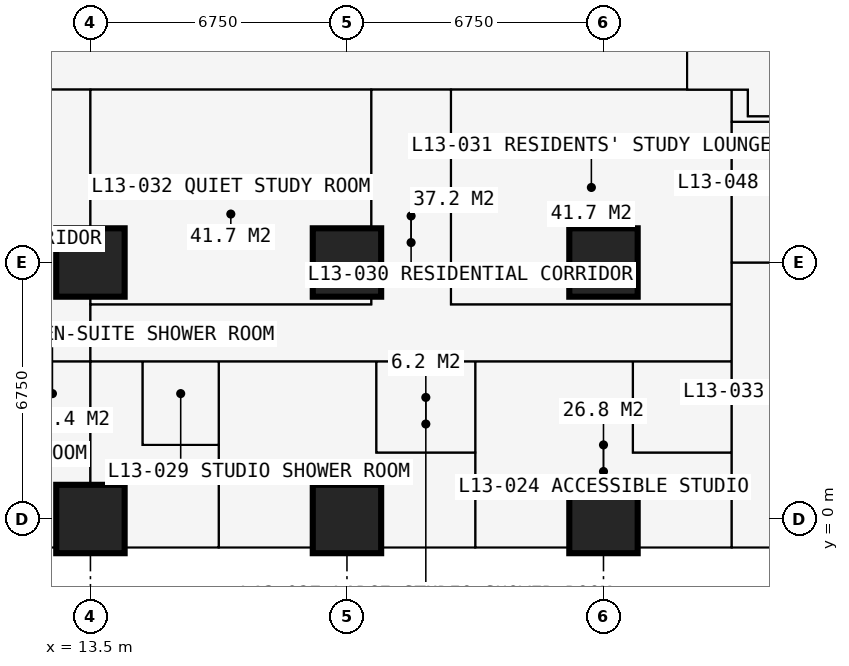
"""IFC4 building model, lengths in metres.
Left out: names, types, materials, properties, quantities, classifications, styles, units other than length and angle.
Written with IfcOpenShell. Run it as: python <this file> out.ifc"""

import sys

from ifc_helpers import new_model, si_unit, direction, frame, frame_2d, origin, origin_2d, place, context, subcontext, project, spatial, rectangle, extrude, element, fill, save


model = new_model("IFC4")
c1 = context("Model", 3, precision=1e-05, world=origin(), true_north=direction((0.0, 1.0)))
c2 = subcontext(c1, "Body", "Model", "MODEL_VIEW")
j1 = project(units=[si_unit("LENGTHUNIT", "METRE"), si_unit("PLANEANGLEUNIT", "RADIAN")], contexts=[c1])
p1 = place(None, origin())
s1 = spatial("IfcSite", under=j1, at=p1, CompositionType="ELEMENT")
p2 = place(p1, origin())
s2 = spatial("IfcBuilding", under=s1, at=p2, CompositionType="ELEMENT")
p3 = place(p2, frame((0.0, 0.0, 50.4)))
s3 = spatial("IfcBuildingStorey", under=s2, at=p3, CompositionType="ELEMENT", Elevation=50.4)
for number, where, z_axis, x_axis in (
    (1, (13.5, 0.0, 0.0), (0.0, 0.0, 1.0), (1.0, 0.0, 0.0)),
    (2, (13.5, 6.75, 0.0), (0.0, 0.0, 1.0), (1.0, 0.0, 0.0)),
    (3, (20.25, 0.0, 0.0), (0.0, 0.0, 1.0), (1.0, 0.0, 0.0)),
    (4, (20.25, 6.75, 0.0), (0.0, 0.0, 1.0), (1.0, 0.0, 0.0)),
    (5, (27.0, 0.0, 0.0), (0.0, 0.0, 1.0), (1.0, 0.0, 0.0)),
    (6, (27.0, 6.75, 0.0), (0.0, 0.0, 1.0), (1.0, 0.0, 0.0)),
):
    element("IfcColumn", number, at=place(p3, frame(where, z_axis=z_axis, x_axis=x_axis)), inside=s3, PredefinedType="COLUMN", context=c2, shape_type="SweptSolid", body=[
        extrude(rectangle(XDim=1.8, YDim=1.8, at=origin_2d()), origin(), (0.0, 0.0, 1.0), 3.6),
    ])
p4 = place(p3, frame((27.0, -0.75, 0.0), z_axis=(0.0, 0.0, 1.0), x_axis=(-1.0, 0.0, 0.0)))
e7 = element("IfcWall", 7, at=p4, inside=s3, PredefinedType="SOLIDWALL", context=c2, shape_type="SweptSolid", body=[
    extrude(rectangle(XDim=6.75, YDim=0.15, at=frame_2d((3.375, 0.0))), origin(), (0.0, 0.0, 1.0), 3.375),
])
p5 = place(p4, frame((0.962, 0.0, 0.0)))
e8 = element("IfcOpeningElement", 8, at=p5, cuts=e7, PredefinedType="OPENING", context=c2, shape_type="SweptSolid", body=[
    extrude(rectangle(XDim=1.0, YDim=2.2, at=frame_2d((0.5, 1.1))), frame((0.0, 0.085, 0.0), z_axis=(0.0, -1.0, 0.0), x_axis=(1.0, 0.0, 0.0)), (0.0, 0.0, 1.0), 0.17),
])
p6 = place(p4, frame((2.025, 0.0, 0.9)))
e9 = element("IfcOpeningElement", 9, at=p6, cuts=e7, PredefinedType="OPENING", context=c2, shape_type="SweptSolid", body=[
    extrude(rectangle(XDim=1.2, YDim=1.8, at=frame_2d((0.6, 0.9))), frame((0.0, 0.085, 0.0), z_axis=(0.0, -1.0, 0.0), x_axis=(1.0, 0.0, 0.0)), (0.0, 0.0, 1.0), 0.17),
])
p7 = place(p4, frame((4.788, 0.0, 0.0)))
e10 = element("IfcOpeningElement", 10, at=p7, cuts=e7, PredefinedType="OPENING", context=c2, shape_type="SweptSolid", body=[
    extrude(rectangle(XDim=1.0, YDim=2.2, at=frame_2d((0.5, 1.1))), frame((0.0, 0.085, 0.0), z_axis=(0.0, -1.0, 0.0), x_axis=(1.0, 0.0, 0.0)), (0.0, 0.0, 1.0), 0.17),
])
p8 = place(p4, frame((3.525, 0.0, 0.9)))
e11 = element("IfcOpeningElement", 11, at=p8, cuts=e7, PredefinedType="OPENING", context=c2, shape_type="SweptSolid", body=[
    extrude(rectangle(XDim=1.2, YDim=1.8, at=frame_2d((0.6, 0.9))), frame((0.0, 0.085, 0.0), z_axis=(0.0, -1.0, 0.0), x_axis=(1.0, 0.0, 0.0)), (0.0, 0.0, 1.0), 0.17),
])
p9 = place(p3, frame((23.625, -0.85, 0.0), z_axis=(0.0, 0.0, 1.0), x_axis=(0.0, -1.0, 0.0)))
e12 = element("IfcWall", 12, at=p9, inside=s3, PredefinedType="USERDEFINED", context=c2, shape_type="SweptSolid", body=[
    extrude(rectangle(XDim=2.2, YDim=1.0, at=frame_2d((1.1, 0.0))), origin(), (0.0, 0.0, 1.0), 0.9),
])
p10 = place(p3, frame((6.75, 4.15, 0.0), z_axis=(0.0, 0.0, 1.0), x_axis=(1.0, 0.0, 0.0)))
e13 = element("IfcWall", 13, at=p10, inside=s3, PredefinedType="PARTITIONING", context=c2, shape_type="SweptSolid", body=[
    extrude(rectangle(XDim=23.625, YDim=0.15, at=frame_2d((11.812, 0.0))), origin(), (0.0, 0.0, 1.0), 3.375),
])
p11 = place(p10, frame((0.2, 0.0, 0.0)))
e14 = element("IfcOpeningElement", 14, at=p11, cuts=e13, PredefinedType="OPENING", context=c2, shape_type="SweptSolid", body=[
    extrude(rectangle(XDim=0.95, YDim=2.2, at=frame_2d((0.475, 1.1))), frame((0.0, 0.085, 0.0), z_axis=(0.0, -1.0, 0.0), x_axis=(1.0, 0.0, 0.0)), (0.0, 0.0, 1.0), 0.17),
])
p12 = place(p10, frame((3.625, 0.0, 0.0)))
e15 = element("IfcOpeningElement", 15, at=p12, cuts=e13, PredefinedType="OPENING", context=c2, shape_type="SweptSolid", body=[
    extrude(rectangle(XDim=0.95, YDim=2.2, at=frame_2d((0.475, 1.1))), frame((0.0, 0.085, 0.0), z_axis=(0.0, -1.0, 0.0), x_axis=(1.0, 0.0, 0.0)), (0.0, 0.0, 1.0), 0.17),
])
p13 = place(p10, frame((18.475, 0.0, 0.0)))
e16 = element("IfcOpeningElement", 16, at=p13, cuts=e13, PredefinedType="OPENING", context=c2, shape_type="SweptSolid", body=[
    extrude(rectangle(XDim=0.95, YDim=2.2, at=frame_2d((0.475, 1.1))), frame((0.0, 0.085, 0.0), z_axis=(0.0, -1.0, 0.0), x_axis=(1.0, 0.0, 0.0)), (0.0, 0.0, 1.0), 0.17),
])
p14 = place(p10, frame((11.725, 0.0, 0.0)))
e17 = element("IfcOpeningElement", 17, at=p14, cuts=e13, PredefinedType="OPENING", context=c2, shape_type="SweptSolid", body=[
    extrude(rectangle(XDim=0.95, YDim=2.2, at=frame_2d((0.475, 1.1))), frame((0.0, 0.085, 0.0), z_axis=(0.0, -1.0, 0.0), x_axis=(1.0, 0.0, 0.0)), (0.0, 0.0, 1.0), 0.17),
])
p15 = place(p10, frame((6.95, 0.0, 0.0)))
e18 = element("IfcOpeningElement", 18, at=p15, cuts=e13, PredefinedType="OPENING", context=c2, shape_type="SweptSolid", body=[
    extrude(rectangle(XDim=0.95, YDim=2.2, at=frame_2d((0.475, 1.1))), frame((0.0, 0.085, 0.0), z_axis=(0.0, -1.0, 0.0), x_axis=(1.0, 0.0, 0.0)), (0.0, 0.0, 1.0), 0.17),
])
p16 = place(p3, frame((10.125, 11.3, 0.0), z_axis=(0.0, 0.0, 1.0), x_axis=(1.0, 0.0, 0.0)))
e19 = element("IfcWall", 19, at=p16, inside=s3, PredefinedType="PARTITIONING", context=c2, shape_type="SweptSolid", body=[
    extrude(rectangle(XDim=20.675, YDim=0.15, at=frame_2d((10.337, 0.0))), origin(), (0.0, 0.0, 1.0), 3.375),
])
p17 = place(p16, frame((1.775, 0.0, 0.0)))
e20 = element("IfcOpeningElement", 20, at=p17, cuts=e19, PredefinedType="OPENING", context=c2, shape_type="SweptSolid", body=[
    extrude(rectangle(XDim=1.0, YDim=2.2, at=frame_2d((0.5, 1.1))), frame((0.0, 0.085, 0.0), z_axis=(0.0, -1.0, 0.0), x_axis=(1.0, 0.0, 0.0)), (0.0, 0.0, 1.0), 0.17),
])
p18 = place(p16, frame((11.312, 0.0, 0.0)))
e21 = element("IfcOpeningElement", 21, at=p18, cuts=e19, PredefinedType="OPENING", context=c2, shape_type="SweptSolid", body=[
    extrude(rectangle(XDim=1.0, YDim=2.2, at=frame_2d((0.5, 1.1))), frame((0.0, 0.085, 0.0), z_axis=(0.0, -1.0, 0.0), x_axis=(1.0, 0.0, 0.0)), (0.0, 0.0, 1.0), 0.17),
])
p19 = place(p3, frame((11.5, 1.95, 0.0), z_axis=(0.0, 0.0, 1.0), x_axis=(1.0, 0.0, 0.0)))
e22 = element("IfcWall", 22, at=p19, inside=s3, PredefinedType="PARTITIONING", context=c2, shape_type="SweptSolid", body=[
    extrude(rectangle(XDim=2.0, YDim=0.1, at=frame_2d((1.0, 0.0))), origin(), (0.0, 0.0, 1.0), 3.375),
])
p20 = place(p3, frame((13.5, -0.734, 0.0), z_axis=(0.0, 0.0, 1.0), x_axis=(0.0, 1.0, 0.0)))
e23 = element("IfcWall", 23, at=p20, inside=s3, PredefinedType="PARTITIONING", context=c2, shape_type="SweptSolid", body=[
    extrude(rectangle(XDim=12.034, YDim=0.15, at=frame_2d((6.017, 0.0))), origin(), (0.0, 0.0, 1.0), 2.61),
])
p21 = place(p3, frame((13.5, 5.65, 0.0), z_axis=(0.0, 0.0, 1.0), x_axis=(1.0, 0.0, 0.0)))
e24 = element("IfcWall", 24, at=p21, inside=s3, PredefinedType="PARTITIONING", context=c2, shape_type="SweptSolid", body=[
    extrude(rectangle(XDim=7.387, YDim=0.15, at=frame_2d((3.694, 0.0))), origin(), (0.0, 0.0, 1.0), 3.375),
])
p22 = place(p21, frame((3.2, 0.0, 0.0)))
e25 = element("IfcOpeningElement", 25, at=p22, cuts=e24, PredefinedType="OPENING", context=c2, shape_type="SweptSolid", body=[
    extrude(rectangle(XDim=0.95, YDim=2.2, at=frame_2d((0.475, 1.1))), frame((0.0, 0.085, 0.0), z_axis=(0.0, -1.0, 0.0), x_axis=(1.0, 0.0, 0.0)), (0.0, 0.0, 1.0), 0.17),
])
p23 = place(p3, frame((14.875, 1.95, 0.0), z_axis=(0.0, 0.0, 1.0), x_axis=(0.0, 1.0, 0.0)))
e26 = element("IfcWall", 26, at=p23, inside=s3, PredefinedType="PARTITIONING", context=c2, shape_type="SweptSolid", body=[
    extrude(rectangle(XDim=2.2, YDim=0.1, at=frame_2d((1.1, 0.0))), origin(), (0.0, 0.0, 1.0), 3.375),
])
p24 = place(p3, frame((14.875, 1.95, 0.0), z_axis=(0.0, 0.0, 1.0), x_axis=(1.0, 0.0, 0.0)))
e27 = element("IfcWall", 27, at=p24, inside=s3, PredefinedType="PARTITIONING", context=c2, shape_type="SweptSolid", body=[
    extrude(rectangle(XDim=2.0, YDim=0.1, at=frame_2d((1.0, 0.0))), origin(), (0.0, 0.0, 1.0), 3.375),
])
p25 = place(p3, frame((16.875, -0.734, 0.0), z_axis=(0.0, 0.0, 1.0), x_axis=(0.0, 1.0, 0.0)))
e28 = element("IfcWall", 28, at=p25, inside=s3, PredefinedType="PARTITIONING", context=c2, shape_type="SweptSolid", body=[
    extrude(rectangle(XDim=4.884, YDim=0.175, at=frame_2d((2.442, 0.0))), origin(), (0.0, 0.0, 1.0), 3.375),
])
p26 = place(p25, frame((3.334, 0.0, 0.0)))
e29 = element("IfcOpeningElement", 29, at=p26, cuts=e28, PredefinedType="OPENING", context=c2, shape_type="SweptSolid", body=[
    extrude(rectangle(XDim=0.9, YDim=2.2, at=frame_2d((0.45, 1.1))), frame((0.0, 0.097, 0.0), z_axis=(0.0, -1.0, 0.0), x_axis=(1.0, 0.0, 0.0)), (0.0, 0.0, 1.0), 0.195),
])
p27 = place(p3, frame((20.887, 5.65, 0.0), z_axis=(0.0, 0.0, 1.0), x_axis=(0.0, 1.0, 0.0)))
e30 = element("IfcWall", 30, at=p27, inside=s3, PredefinedType="PARTITIONING", context=c2, shape_type="SweptSolid", body=[
    extrude(rectangle(XDim=5.65, YDim=0.15, at=frame_2d((2.825, 0.0))), origin(), (0.0, 0.0, 1.0), 3.375),
])
p28 = place(p3, frame((21.025, 1.75, 0.0), z_axis=(0.0, 0.0, 1.0), x_axis=(0.0, 1.0, 0.0)))
e31 = element("IfcWall", 31, at=p28, inside=s3, PredefinedType="PARTITIONING", context=c2, shape_type="SweptSolid", body=[
    extrude(rectangle(XDim=2.4, YDim=0.1, at=frame_2d((1.2, 0.0))), origin(), (0.0, 0.0, 1.0), 3.375),
])
p29 = place(p3, frame((21.025, 1.75, 0.0), z_axis=(0.0, 0.0, 1.0), x_axis=(1.0, 0.0, 0.0)))
e32 = element("IfcWall", 32, at=p29, inside=s3, PredefinedType="PARTITIONING", context=c2, shape_type="SweptSolid", body=[
    extrude(rectangle(XDim=2.6, YDim=0.1, at=frame_2d((1.3, 0.0))), origin(), (0.0, 0.0, 1.0), 3.375),
])
p30 = place(p3, frame((22.988, 5.65, 0.0), z_axis=(0.0, 0.0, 1.0), x_axis=(1.0, 0.0, 0.0)))
e33 = element("IfcWall", 33, at=p30, inside=s3, PredefinedType="PARTITIONING", context=c2, shape_type="SweptSolid", body=[
    extrude(rectangle(XDim=7.387, YDim=0.15, at=frame_2d((3.694, 0.0))), origin(), (0.0, 0.0, 1.0), 3.375),
])
p31 = place(p30, frame((2.15, 0.0, 0.0)))
e34 = element("IfcOpeningElement", 34, at=p31, cuts=e33, PredefinedType="OPENING", context=c2, shape_type="SweptSolid", body=[
    extrude(rectangle(XDim=0.95, YDim=2.2, at=frame_2d((0.475, 1.1))), frame((0.0, 0.085, 0.0), z_axis=(0.0, -1.0, 0.0), x_axis=(1.0, 0.0, 0.0)), (0.0, 0.0, 1.0), 0.17),
])
p32 = place(p3, frame((22.988, 5.65, 0.0), z_axis=(0.0, 0.0, 1.0), x_axis=(0.0, 1.0, 0.0)))
e35 = element("IfcWall", 35, at=p32, inside=s3, PredefinedType="PARTITIONING", context=c2, shape_type="SweptSolid", body=[
    extrude(rectangle(XDim=5.65, YDim=0.15, at=frame_2d((2.825, 0.0))), origin(), (0.0, 0.0, 1.0), 3.375),
])
p33 = place(p3, frame((23.625, -0.734, 0.0), z_axis=(0.0, 0.0, 1.0), x_axis=(0.0, 1.0, 0.0)))
e36 = element("IfcWall", 36, at=p33, inside=s3, PredefinedType="PARTITIONING", context=c2, shape_type="SweptSolid", body=[
    extrude(rectangle(XDim=4.884, YDim=0.175, at=frame_2d((2.442, 0.0))), origin(), (0.0, 0.0, 1.0), 3.375),
])
p34 = place(p33, frame((3.234, 0.0, 0.0)))
e37 = element("IfcOpeningElement", 37, at=p34, cuts=e36, PredefinedType="OPENING", context=c2, shape_type="SweptSolid", body=[
    extrude(rectangle(XDim=0.9, YDim=2.2, at=frame_2d((0.45, 1.1))), frame((0.0, 0.097, 0.0), z_axis=(0.0, -1.0, 0.0), x_axis=(1.0, 0.0, 0.0)), (0.0, 0.0, 1.0), 0.195),
])
p35 = place(p3, frame((27.775, 1.75, 0.0), z_axis=(0.0, 0.0, 1.0), x_axis=(0.0, 1.0, 0.0)))
e38 = element("IfcWall", 38, at=p35, inside=s3, PredefinedType="PARTITIONING", context=c2, shape_type="SweptSolid", body=[
    extrude(rectangle(XDim=2.4, YDim=0.1, at=frame_2d((1.2, 0.0))), origin(), (0.0, 0.0, 1.0), 3.375),
])
p36 = place(p3, frame((27.775, 1.75, 0.0), z_axis=(0.0, 0.0, 1.0), x_axis=(1.0, 0.0, 0.0)))
e39 = element("IfcWall", 39, at=p36, inside=s3, PredefinedType="PARTITIONING", context=c2, shape_type="SweptSolid", body=[
    extrude(rectangle(XDim=2.6, YDim=0.1, at=frame_2d((1.3, 0.0))), origin(), (0.0, 0.0, 1.0), 3.375),
])
p37 = place(p36, frame((0.85, 0.0, 0.0)))
e40 = element("IfcOpeningElement", 40, at=p37, cuts=e39, PredefinedType="OPENING", context=c2, shape_type="SweptSolid", body=[
    extrude(rectangle(XDim=0.9, YDim=2.2, at=frame_2d((0.45, 1.1))), frame((0.0, 0.06, 0.0), z_axis=(0.0, -1.0, 0.0), x_axis=(1.0, 0.0, 0.0)), (0.0, 0.0, 1.0), 0.12),
])
p38 = place(p3, frame((29.2, 11.3, 0.0), z_axis=(0.0, 0.0, 1.0), x_axis=(0.0, 1.0, 0.0)))
e41 = element("IfcWall", 41, at=p38, inside=s3, PredefinedType="PARTITIONING", context=c2, shape_type="SweptSolid", body=[
    extrude(rectangle(XDim=17.9, YDim=0.2, at=frame_2d((8.95, 0.0))), origin(), (0.0, 0.0, 1.0), 3.375),
])
p39 = place(p38, frame((8.35, 0.0, 0.0)))
e42 = element("IfcOpeningElement", 42, at=p39, cuts=e41, PredefinedType="OPENING", context=c2, shape_type="SweptSolid", body=[
    extrude(rectangle(XDim=1.2, YDim=2.2, at=frame_2d((0.6, 1.1))), frame((0.0, 0.11, 0.0), z_axis=(0.0, -1.0, 0.0), x_axis=(1.0, 0.0, 0.0)), (0.0, 0.0, 1.0), 0.22),
])
p40 = place(p3, frame((30.375, -0.734, 0.0), z_axis=(0.0, 0.0, 1.0), x_axis=(0.0, 1.0, 0.0)))
e43 = element("IfcWall", 43, at=p40, inside=s3, PredefinedType="PARTITIONING", context=c2, shape_type="SweptSolid", body=[
    extrude(rectangle(XDim=12.034, YDim=0.15, at=frame_2d((6.017, 0.0))), origin(), (0.0, 0.0, 1.0), 3.375),
])
p41 = place(p40, frame((5.134, 0.0, 0.0)))
e44 = element("IfcOpeningElement", 44, at=p41, cuts=e43, PredefinedType="OPENING", context=c2, shape_type="SweptSolid", body=[
    extrude(rectangle(XDim=1.0, YDim=2.2, at=frame_2d((0.5, 1.1))), frame((0.0, 0.085, 0.0), z_axis=(0.0, -1.0, 0.0), x_axis=(1.0, 0.0, 0.0)), (0.0, 0.0, 1.0), 0.17),
])
p42 = place(p3, frame((30.375, 6.75, 0.0), z_axis=(0.0, 0.0, 1.0), x_axis=(1.0, 0.0, 0.0)))
e45 = element("IfcWall", 45, at=p42, inside=s3, PredefinedType="PARTITIONING", context=c2, shape_type="SweptSolid", body=[
    extrude(rectangle(XDim=5.975, YDim=0.15, at=frame_2d((2.988, 0.0))), origin(), (0.0, 0.0, 1.0), 2.877),
])
p43 = place(p3, frame((30.375, 10.45, 0.0), z_axis=(0.0, 0.0, 1.0), x_axis=(1.0, 0.0, 0.0)))
e46 = element("IfcWall", 46, at=p43, inside=s3, PredefinedType="PARTITIONING", context=c2, shape_type="SweptSolid", body=[
    extrude(rectangle(XDim=4.475, YDim=0.15, at=frame_2d((2.238, 0.0))), origin(), (0.0, 0.0, 1.0), 3.375),
])
p44 = place(p43, frame((2.35, 0.0, 0.0)))
e47 = element("IfcOpeningElement", 47, at=p44, cuts=e46, PredefinedType="OPENING", context=c2, shape_type="SweptSolid", body=[
    extrude(rectangle(XDim=0.95, YDim=2.2, at=frame_2d((0.475, 1.1))), frame((0.0, 0.085, 0.0), z_axis=(0.0, -1.0, 0.0), x_axis=(1.0, 0.0, 0.0)), (0.0, 0.0, 1.0), 0.17),
])
p45 = place(p3, frame((30.8, 10.6, 0.0), z_axis=(0.0, 0.0, 1.0), x_axis=(0.0, 1.0, 0.0)))
e48 = element("IfcWall", 48, at=p45, inside=s3, PredefinedType="PARTITIONING", context=c2, shape_type="SweptSolid", body=[
    extrude(rectangle(XDim=0.7, YDim=0.15, at=frame_2d((0.35, 0.0))), origin(), (0.0, 0.0, 1.0), 3.375),
])
p46 = place(p3, frame((30.8, 10.6, 0.0), z_axis=(0.0, 0.0, 1.0), x_axis=(1.0, 0.0, 0.0)))
e49 = element("IfcWall", 49, at=p46, inside=s3, PredefinedType="PARTITIONING", context=c2, shape_type="SweptSolid", body=[
    extrude(rectangle(XDim=1.85, YDim=0.15, at=frame_2d((0.925, 0.0))), origin(), (0.0, 0.0, 1.0), 3.375),
])
p47 = place(p5, origin())
e50 = element("IfcDoor", 50, at=p47, inside=s3, OperationType="SINGLE_SWING_LEFT", PredefinedType="DOOR", context=c2, shape_type="SweptSolid", body=[
    extrude(rectangle(XDim=1.0, YDim=2.2, at=frame_2d((0.5, 1.1))), frame((0.0, 0.025, 0.0), z_axis=(0.0, -1.0, 0.0), x_axis=(1.0, 0.0, 0.0)), (0.0, 0.0, 1.0), 0.05),
])
fill(e8, e50)
p48 = place(p6, origin())
e51 = element("IfcWindow", 51, at=p48, inside=s3, PartitioningType="SINGLE_PANEL", PredefinedType="WINDOW", context=c2, shape_type="SweptSolid", body=[
    extrude(rectangle(XDim=1.2, YDim=1.8, at=frame_2d((0.6, 0.9))), frame((0.0, 0.03, 0.0), z_axis=(0.0, -1.0, 0.0), x_axis=(1.0, 0.0, 0.0)), (0.0, 0.0, 1.0), 0.06),
])
fill(e9, e51)
p49 = place(p7, origin())
e52 = element("IfcDoor", 52, at=p49, inside=s3, OperationType="SINGLE_SWING_RIGHT", PredefinedType="DOOR", context=c2, shape_type="SweptSolid", body=[
    extrude(rectangle(XDim=1.0, YDim=2.2, at=frame_2d((0.5, 1.1))), frame((0.0, 0.025, 0.0), z_axis=(0.0, -1.0, 0.0), x_axis=(1.0, 0.0, 0.0)), (0.0, 0.0, 1.0), 0.05),
])
fill(e10, e52)
p50 = place(p8, origin())
e53 = element("IfcWindow", 53, at=p50, inside=s3, PartitioningType="SINGLE_PANEL", PredefinedType="WINDOW", context=c2, shape_type="SweptSolid", body=[
    extrude(rectangle(XDim=1.2, YDim=1.8, at=frame_2d((0.6, 0.9))), frame((0.0, 0.03, 0.0), z_axis=(0.0, -1.0, 0.0), x_axis=(1.0, 0.0, 0.0)), (0.0, 0.0, 1.0), 0.06),
])
fill(e11, e53)
p51 = place(p17, origin())
e54 = element("IfcDoor", 54, at=p51, inside=s3, OperationType="SINGLE_SWING_LEFT", PredefinedType="DOOR", context=c2, shape_type="SweptSolid", body=[
    extrude(rectangle(XDim=1.0, YDim=2.2, at=frame_2d((0.5, 1.1))), frame((0.0, 0.025, 0.0), z_axis=(0.0, -1.0, 0.0), x_axis=(1.0, 0.0, 0.0)), (0.0, 0.0, 1.0), 0.05),
])
fill(e20, e54)
p52 = place(p13, origin())
e55 = element("IfcDoor", 55, at=p52, inside=s3, OperationType="SINGLE_SWING_LEFT", PredefinedType="DOOR", context=c2, shape_type="SweptSolid", body=[
    extrude(rectangle(XDim=0.95, YDim=2.2, at=frame_2d((0.475, 1.1))), frame((0.0, 0.025, 0.0), z_axis=(0.0, -1.0, 0.0), x_axis=(1.0, 0.0, 0.0)), (0.0, 0.0, 1.0), 0.05),
])
fill(e16, e55)
p53 = place(p37, origin())
e56 = element("IfcDoor", 56, at=p53, inside=s3, OperationType="SINGLE_SWING_RIGHT", PredefinedType="DOOR", context=c2, shape_type="SweptSolid", body=[
    extrude(rectangle(XDim=0.9, YDim=2.2, at=frame_2d((0.45, 1.1))), frame((0.0, 0.025, 0.0), z_axis=(0.0, -1.0, 0.0), x_axis=(1.0, 0.0, 0.0)), (0.0, 0.0, 1.0), 0.05),
])
fill(e40, e56)
p54 = place(p14, origin())
e57 = element("IfcDoor", 57, at=p54, inside=s3, OperationType="SINGLE_SWING_LEFT", PredefinedType="DOOR", context=c2, shape_type="SweptSolid", body=[
    extrude(rectangle(XDim=0.95, YDim=2.2, at=frame_2d((0.475, 1.1))), frame((0.0, 0.025, 0.0), z_axis=(0.0, -1.0, 0.0), x_axis=(1.0, 0.0, 0.0)), (0.0, 0.0, 1.0), 0.05),
])
fill(e17, e57)
p55 = place(p34, origin())
e58 = element("IfcDoor", 58, at=p55, inside=s3, OperationType="SINGLE_SWING_RIGHT", PredefinedType="DOOR", context=c2, shape_type="SweptSolid", body=[
    extrude(rectangle(XDim=0.9, YDim=2.2, at=frame_2d((0.45, 1.1))), frame((0.0, 0.025, 0.0), z_axis=(0.0, -1.0, 0.0), x_axis=(1.0, 0.0, 0.0)), (0.0, 0.0, 1.0), 0.05),
])
fill(e37, e58)
p56 = place(p15, origin())
e59 = element("IfcDoor", 59, at=p56, inside=s3, OperationType="SINGLE_SWING_LEFT", PredefinedType="DOOR", context=c2, shape_type="SweptSolid", body=[
    extrude(rectangle(XDim=0.95, YDim=2.2, at=frame_2d((0.475, 1.1))), frame((0.0, 0.025, 0.0), z_axis=(0.0, -1.0, 0.0), x_axis=(1.0, 0.0, 0.0)), (0.0, 0.0, 1.0), 0.05),
])
fill(e18, e59)
p57 = place(p26, origin())
e60 = element("IfcDoor", 60, at=p57, inside=s3, OperationType="SINGLE_SWING_RIGHT", PredefinedType="DOOR", context=c2, shape_type="SweptSolid", body=[
    extrude(rectangle(XDim=0.9, YDim=2.2, at=frame_2d((0.45, 1.1))), frame((0.0, 0.025, 0.0), z_axis=(0.0, -1.0, 0.0), x_axis=(1.0, 0.0, 0.0)), (0.0, 0.0, 1.0), 0.05),
])
fill(e29, e60)
p58 = place(p18, origin())
e61 = element("IfcDoor", 61, at=p58, inside=s3, OperationType="SINGLE_SWING_LEFT", PredefinedType="DOOR", context=c2, shape_type="SweptSolid", body=[
    extrude(rectangle(XDim=1.0, YDim=2.2, at=frame_2d((0.5, 1.1))), frame((0.0, 0.025, 0.0), z_axis=(0.0, -1.0, 0.0), x_axis=(1.0, 0.0, 0.0)), (0.0, 0.0, 1.0), 0.05),
])
fill(e21, e61)
p59 = place(p31, origin())
e62 = element("IfcDoor", 62, at=p59, inside=s3, OperationType="SINGLE_SWING_LEFT", PredefinedType="DOOR", context=c2, shape_type="SweptSolid", body=[
    extrude(rectangle(XDim=0.95, YDim=2.2, at=frame_2d((0.475, 1.1))), frame((0.0, 0.025, 0.0), z_axis=(0.0, -1.0, 0.0), x_axis=(1.0, 0.0, 0.0)), (0.0, 0.0, 1.0), 0.05),
])
fill(e34, e62)
p60 = place(p22, origin())
e63 = element("IfcDoor", 63, at=p60, inside=s3, OperationType="SINGLE_SWING_LEFT", PredefinedType="DOOR", context=c2, shape_type="SweptSolid", body=[
    extrude(rectangle(XDim=0.95, YDim=2.2, at=frame_2d((0.475, 1.1))), frame((0.0, 0.025, 0.0), z_axis=(0.0, -1.0, 0.0), x_axis=(1.0, 0.0, 0.0)), (0.0, 0.0, 1.0), 0.05),
])
fill(e25, e63)
p61 = place(p41, origin())
e64 = element("IfcDoor", 64, at=p61, inside=s3, OperationType="SINGLE_SWING_LEFT", PredefinedType="DOOR", context=c2, shape_type="SweptSolid", body=[
    extrude(rectangle(XDim=1.0, YDim=2.2, at=frame_2d((0.5, 1.1))), frame((0.0, 0.025, 0.0), z_axis=(0.0, -1.0, 0.0), x_axis=(1.0, 0.0, 0.0)), (0.0, 0.0, 1.0), 0.05),
])
fill(e44, e64)
save(model, sys.argv[1])
